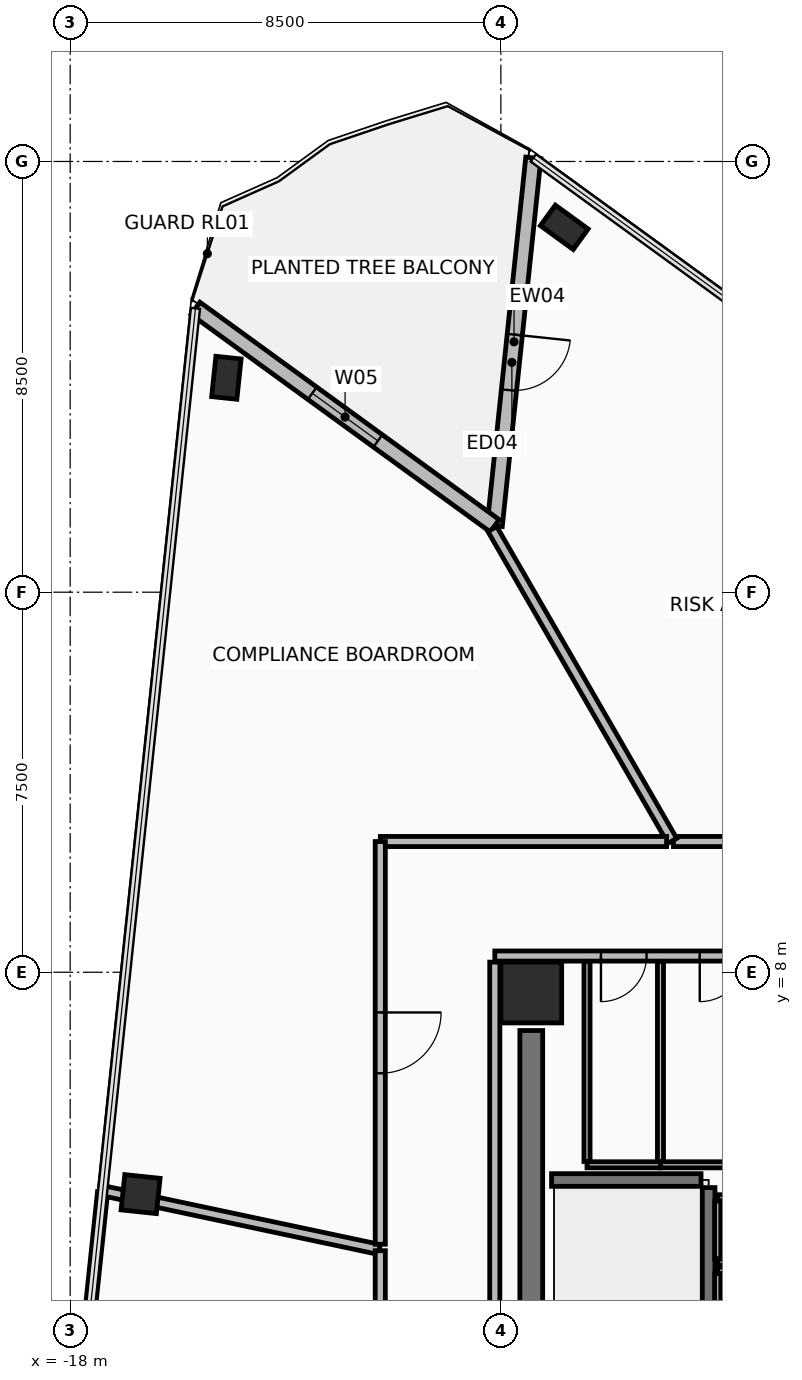
"""IFC4 building model, lengths in metres.
Left out: names, types, materials, properties, quantities, classifications, styles, units other than length and angle.
Written with IfcOpenShell. Run it as: python <this file> out.ifc"""

import sys

from ifc_helpers import new_model, si_unit, direction, frame, frame_2d, origin, origin_2d, place, context, subcontext, project, spatial, rectangle, hollow_rectangle, extrude, element, fill, save


model = new_model("IFC4")
c1 = context("Model", 3, precision=1e-05, world=origin(), true_north=direction((0.0, 1.0)))
c2 = subcontext(c1, "Body", "Model", "MODEL_VIEW")
j1 = project(units=[si_unit("LENGTHUNIT", "METRE"), si_unit("PLANEANGLEUNIT", "RADIAN")], contexts=[c1])
p1 = place(None, origin())
s1 = spatial("IfcSite", under=j1, at=p1, CompositionType="ELEMENT")
p2 = place(p1, origin())
s2 = spatial("IfcBuilding", under=s1, at=p2, CompositionType="ELEMENT")
p3 = place(p2, frame((0.0, 0.0, 126.85)))
s3 = spatial("IfcBuildingStorey", under=s2, at=p3, CompositionType="ELEMENT", Elevation=126.85)
p4 = place(p3, frame((-8.9, 7.6, 0.0), z_axis=(0.0, 0.0, 1.0), x_axis=(1.0, 0.0, 0.0)))
e1 = element("IfcColumn", 1, at=p4, inside=s3, PredefinedType="COLUMN", context=c2, shape_type="SweptSolid", body=[
    extrude(rectangle(XDim=1.2, YDim=1.2, at=origin_2d()), origin(), (0.0, 0.0, 1.0), 3.6),
])
p5 = place(p3, frame((-14.917, 19.731, 0.0), z_axis=(0.0, 0.0, 1.0), x_axis=(0.104530199036, 0.99452171293, 0.0)))
e2 = element("IfcColumn", 2, at=p5, inside=s3, PredefinedType="COLUMN", context=c2, shape_type="SweptSolid", body=[
    extrude(hollow_rectangle(XDim=0.5, YDim=0.8, WallThickness=0.04, at=origin_2d()), origin(), (0.0, 0.0, 1.0), 3.6),
])
p6 = place(p3, frame((-16.611, 3.622, 0.0), z_axis=(0.0, 0.0, 1.0), x_axis=(0.104530199036, 0.99452171293, 0.0)))
e3 = element("IfcColumn", 3, at=p6, inside=s3, PredefinedType="COLUMN", context=c2, shape_type="SweptSolid", body=[
    extrude(hollow_rectangle(XDim=0.7, YDim=0.7, WallThickness=0.04, at=origin_2d()), origin(), (0.0, 0.0, 1.0), 3.6),
])
p7 = place(p3, frame((-8.249, 22.701, 0.0), z_axis=(0.0, 0.0, 1.0), x_axis=(-0.809016994375, 0.587785252292, 0.0)))
e4 = element("IfcColumn", 4, at=p7, inside=s3, PredefinedType="COLUMN", context=c2, shape_type="SweptSolid", body=[
    extrude(hollow_rectangle(XDim=0.5, YDim=0.8, WallThickness=0.04, at=origin_2d()), origin(), (0.0, 0.0, 1.0), 3.6),
])
p8 = place(p3, frame((-8.859, 24.071, 0.0), z_axis=(0.0, 0.0, 1.0), x_axis=(-0.104512431924, -0.9945235802, 0.0)))
e5 = element("IfcWall", 5, at=p8, inside=s3, PredefinedType="STANDARD", context=c2, shape_type="SweptSolid", body=[
    extrude(rectangle(XDim=7.3, YDim=0.3, at=frame_2d((3.65, 0.0))), origin(), (0.0, 0.0, 1.0), 2.705),
])
p9 = place(p8, frame((3.508, 0.0, 0.0)))
e6 = element("IfcOpeningElement", 6, at=p9, cuts=e5, PredefinedType="OPENING", context=c2, shape_type="SweptSolid", body=[
    extrude(rectangle(XDim=1.1, YDim=2.2, at=frame_2d((0.55, 1.1))), frame((0.0, 0.16, 0.0), z_axis=(0.0, -1.0, 0.0), x_axis=(1.0, 0.0, 0.0)), (0.0, 0.0, 1.0), 0.32),
])
p10 = place(p3, frame((-9.622, 16.811, 0.0), z_axis=(0.0, 0.0, 1.0), x_axis=(-0.809002104592, 0.587805745775, 0.0)))
e7 = element("IfcWall", 7, at=p10, inside=s3, PredefinedType="STANDARD", context=c2, shape_type="SweptSolid", body=[
    extrude(rectangle(XDim=7.3, YDim=0.3, at=frame_2d((3.65, 0.0))), origin(), (0.0, 0.0, 1.0), 2.705),
])
p11 = place(p10, frame((2.85, 0.0, 0.325)))
e8 = element("IfcOpeningElement", 8, at=p11, cuts=e7, PredefinedType="OPENING", context=c2, shape_type="SweptSolid", body=[
    extrude(rectangle(XDim=1.6, YDim=2.2, at=frame_2d((0.8, 1.1))), frame((0.0, 0.16, 0.0), z_axis=(0.0, -1.0, 0.0), x_axis=(1.0, 0.0, 0.0)), (0.0, 0.0, 1.0), 0.32),
])
p12 = place(p3, frame((-8.9, -3.85, 0.0), z_axis=(0.0, 0.0, 1.0), x_axis=(0.0, 1.0, 0.0)))
e9 = element("IfcWall", 9, at=p12, inside=s3, PredefinedType="SHEAR", context=c2, shape_type="SweptSolid", body=[
    extrude(rectangle(XDim=10.7, YDim=0.45, at=frame_2d((5.35, 0.0))), origin(), (0.0, 0.0, 1.0), 3.41),
])
p13 = place(p3, frame((9.62, 8.32, 0.0), z_axis=(0.0, 0.0, 1.0), x_axis=(-1.0, 0.0, 0.0)))
e10 = element("IfcWall", 10, at=p13, inside=s3, PredefinedType="PARTITIONING", context=c2, shape_type="SweptSolid", body=[
    extrude(rectangle(XDim=19.24, YDim=0.2, at=frame_2d((9.62, 0.0))), origin(), (0.0, 0.0, 1.0), 2.755),
])
p14 = place(p13, frame((16.245, 0.0, 0.0)))
e11 = element("IfcOpeningElement", 11, at=p14, cuts=e10, PredefinedType="OPENING", context=c2, shape_type="SweptSolid", body=[
    extrude(rectangle(XDim=0.9, YDim=2.1, at=frame_2d((0.45, 1.05))), frame((0.0, 0.11, 0.0), z_axis=(0.0, -1.0, 0.0), x_axis=(1.0, 0.0, 0.0)), (0.0, 0.0, 1.0), 0.22),
])
p15 = place(p13, frame((14.295, 0.0, 0.0)))
e12 = element("IfcOpeningElement", 12, at=p15, cuts=e10, PredefinedType="OPENING", context=c2, shape_type="SweptSolid", body=[
    extrude(rectangle(XDim=0.9, YDim=2.1, at=frame_2d((0.45, 1.05))), frame((0.0, 0.11, 0.0), z_axis=(0.0, -1.0, 0.0), x_axis=(1.0, 0.0, 0.0)), (0.0, 0.0, 1.0), 0.22),
])
p16 = place(p3, frame((-9.62, 8.2, 0.0), z_axis=(0.0, 0.0, 1.0), x_axis=(0.0, -1.0, 0.0)))
e13 = element("IfcWall", 13, at=p16, inside=s3, PredefinedType="PARTITIONING", context=c2, shape_type="SweptSolid", body=[
    extrude(rectangle(XDim=16.4, YDim=0.2, at=frame_2d((8.2, 0.0))), origin(), (0.0, 0.0, 1.0), 2.855),
])
p17 = place(p16, frame((12.65, 0.0, 0.0)))
e14 = element("IfcOpeningElement", 14, at=p17, cuts=e13, PredefinedType="OPENING", context=c2, shape_type="SweptSolid", body=[
    extrude(rectangle(XDim=1.1, YDim=2.15, at=frame_2d((0.55, 1.075))), frame((0.0, 0.11, 0.0), z_axis=(0.0, -1.0, 0.0), x_axis=(1.0, 0.0, 0.0)), (0.0, 0.0, 1.0), 0.22),
])
p18 = place(p3, frame((-5.4, -3.55, 0.0), z_axis=(0.0, 0.0, 1.0), x_axis=(0.0, 1.0, 0.0)))
e15 = element("IfcWall", 15, at=p18, inside=s3, PredefinedType="SHEAR", context=c2, shape_type="SweptSolid", body=[
    extrude(rectangle(XDim=7.3, YDim=0.25, at=frame_2d((3.65, 0.0))), origin(), (0.0, 0.0, 1.0), 3.41),
])
p19 = place(p3, frame((-8.5, 3.9, 0.0), z_axis=(0.0, 0.0, 1.0), x_axis=(1.0, 0.0, 0.0)))
e16 = element("IfcWall", 16, at=p19, inside=s3, PredefinedType="SHEAR", context=c2, shape_type="SweptSolid", body=[
    extrude(rectangle(XDim=2.95, YDim=0.25, at=frame_2d((1.475, 0.0))), origin(), (0.0, 0.0, 1.0), 3.41),
])
p20 = place(p3, frame((-5.22, 2.28, 0.0), z_axis=(0.0, 0.0, 1.0), x_axis=(1.0, 0.0, 0.0)))
e17 = element("IfcWall", 17, at=p20, inside=s3, PredefinedType="PARTITIONING", context=c2, shape_type="SweptSolid", body=[
    extrude(rectangle(XDim=3.47, YDim=0.12, at=frame_2d((1.735, 0.0))), origin(), (0.0, 0.0, 1.0), 3.41),
])
p21 = place(p3, frame((-1.815, 3.55, 0.0), z_axis=(0.0, 0.0, 1.0), x_axis=(-1.0, 0.0, 0.0)))
e18 = element("IfcWall", 18, at=p21, inside=s3, PredefinedType="PARTITIONING", context=c2, shape_type="SweptSolid", body=[
    extrude(rectangle(XDim=3.405, YDim=0.12, at=frame_2d((1.703, 0.0))), origin(), (0.0, 0.0, 1.0), 3.41),
])
p22 = place(p3, frame((-5.22, 3.485, 0.0), z_axis=(0.0, 0.0, 1.0), x_axis=(0.0, -1.0, 0.0)))
e19 = element("IfcWall", 19, at=p22, inside=s3, PredefinedType="PARTITIONING", context=c2, shape_type="SweptSolid", body=[
    extrude(rectangle(XDim=1.14, YDim=0.12, at=frame_2d((0.57, 0.0))), origin(), (0.0, 0.0, 1.0), 3.41),
])
p23 = place(p3, frame((-1.815, 2.12, 0.0), z_axis=(0.0, 0.0, 1.0), x_axis=(-1.0, 0.0, 0.0)))
e20 = element("IfcWall", 20, at=p23, inside=s3, PredefinedType="PARTITIONING", context=c2, shape_type="SweptSolid", body=[
    extrude(rectangle(XDim=3.405, YDim=0.12, at=frame_2d((1.703, 0.0))), origin(), (0.0, 0.0, 1.0), 3.41),
])
p24 = place(p3, frame((-5.22, 2.055, 0.0), z_axis=(0.0, 0.0, 1.0), x_axis=(0.0, -1.0, 0.0)))
e21 = element("IfcWall", 21, at=p24, inside=s3, PredefinedType="PARTITIONING", context=c2, shape_type="SweptSolid", body=[
    extrude(rectangle(XDim=1.11, YDim=0.12, at=frame_2d((0.555, 0.0))), origin(), (0.0, 0.0, 1.0), 3.41),
])
p25 = place(p3, frame((-7.8, 4.2, 0.0), z_axis=(0.0, 0.0, 1.0), x_axis=(1.0, 0.0, 0.0)))
e22 = element("IfcWall", 22, at=p25, inside=s3, PredefinedType="PARTITIONING", context=c2, shape_type="SweptSolid", body=[
    extrude(rectangle(XDim=1.45, YDim=0.12, at=frame_2d((0.725, 0.0))), origin(), (0.0, 0.0, 1.0), 3.41),
])
for number, where, z_axis, x_axis in (
    (23, (-6.35, 4.265, 0.0), (0.0, 0.0, 1.0), (0.0, 1.0, 0.0)),
    (24, (-7.8, 8.215, 0.0), (0.0, 0.0, 1.0), (0.0, -1.0, 0.0)),
):
    element("IfcWall", number, at=place(p3, frame(where, z_axis=z_axis, x_axis=x_axis)), inside=s3, PredefinedType="PARTITIONING", context=c2, shape_type="SweptSolid", body=[
        extrude(rectangle(XDim=3.95, YDim=0.12, at=frame_2d((1.975, 0.0))), origin(), (0.0, 0.0, 1.0), 2.605),
    ])
p26 = place(p3, frame((-6.35, 4.2, 0.0), z_axis=(0.0, 0.0, 1.0), x_axis=(1.0, 0.0, 0.0)))
e25 = element("IfcWall", 25, at=p26, inside=s3, PredefinedType="PARTITIONING", context=c2, shape_type="SweptSolid", body=[
    extrude(rectangle(XDim=2.45, YDim=0.12, at=frame_2d((1.225, 0.0))), origin(), (0.0, 0.0, 1.0), 3.41),
])
p27 = place(p3, frame((-19.067, -12.57, 0.0), z_axis=(0.0, 0.0, 1.0), x_axis=(0.104530607356, 0.994521670013, 0.0)))
e26 = element("IfcWall", 26, at=p27, inside=s3, PredefinedType="PARTITIONING", context=c2, shape_type="SweptSolid", body=[
    extrude(rectangle(XDim=16.321, YDim=0.2, at=frame_2d((8.161, 0.0))), origin(), (0.0, 0.0, 1.0), 3.41),
])
p28 = place(p3, frame((-17.331, 3.684, 0.0), z_axis=(0.0, 0.0, 1.0), x_axis=(0.978148567961, -0.207907140322, 0.0)))
e27 = element("IfcWall", 27, at=p28, inside=s3, PredefinedType="PARTITIONING", context=c2, shape_type="SweptSolid", body=[
    extrude(rectangle(XDim=5.552, YDim=0.2, at=frame_2d((2.776, 0.0))), origin(), (0.0, 0.0, 1.0), 2.705),
])
p29 = place(p3, frame((-11.88, 2.505, 0.0), z_axis=(0.0, 0.0, 1.0), x_axis=(0.0, -1.0, 0.0)))
e28 = element("IfcWall", 28, at=p29, inside=s3, PredefinedType="PARTITIONING", context=c2, shape_type="SweptSolid", body=[
    extrude(rectangle(XDim=9.396, YDim=0.2, at=frame_2d((4.698, 0.0))), origin(), (0.0, 0.0, 1.0), 3.41),
])
p30 = place(p29, frame((4.273, 0.0, 0.0)))
e29 = element("IfcOpeningElement", 29, at=p30, cuts=e28, PredefinedType="OPENING", context=c2, shape_type="SweptSolid", body=[
    extrude(rectangle(XDim=0.85, YDim=2.1, at=frame_2d((0.425, 1.05))), frame((0.0, 0.11, 0.0), z_axis=(0.0, -1.0, 0.0), x_axis=(1.0, 0.0, 0.0)), (0.0, 0.0, 1.0), 0.22),
])
p31 = place(p3, frame((3.419, 10.58, 0.0), z_axis=(0.0, 0.0, 1.0), x_axis=(-1.0, 0.0, 0.0)))
e30 = element("IfcWall", 30, at=p31, inside=s3, PredefinedType="PARTITIONING", context=c2, shape_type="SweptSolid", body=[
    extrude(rectangle(XDim=9.513, YDim=0.2, at=frame_2d((4.757, 0.0))), origin(), (0.0, 0.0, 1.0), 3.045),
])
p32 = place(p31, frame((4.257, 0.0, 0.0)))
e31 = element("IfcOpeningElement", 31, at=p32, cuts=e30, PredefinedType="OPENING", context=c2, shape_type="SweptSolid", body=[
    extrude(rectangle(XDim=1.0, YDim=2.15, at=frame_2d((0.5, 1.075))), frame((0.0, 0.11, 0.0), z_axis=(0.0, -1.0, 0.0), x_axis=(1.0, 0.0, 0.0)), (0.0, 0.0, 1.0), 0.22),
])
p33 = place(p3, frame((-6.115, 10.593, 0.0), z_axis=(0.0, 0.0, 1.0), x_axis=(-0.50001885532, 0.866014517387, 0.0)))
e32 = element("IfcWall", 32, at=p33, inside=s3, PredefinedType="PARTITIONING", context=c2, shape_type="SweptSolid", body=[
    extrude(rectangle(XDim=7.106, YDim=0.2, at=frame_2d((3.553, 0.0))), origin(), (0.0, 0.0, 1.0), 2.855),
])
p34 = place(p3, frame((-6.229, 10.58, 0.0), z_axis=(0.0, 0.0, 1.0), x_axis=(-1.0, 0.0, 0.0)))
e33 = element("IfcWall", 33, at=p34, inside=s3, PredefinedType="PARTITIONING", context=c2, shape_type="SweptSolid", body=[
    extrude(rectangle(XDim=5.65, YDim=0.2, at=frame_2d((2.825, 0.0))), origin(), (0.0, 0.0, 1.0), 2.755),
])
p35 = place(p3, frame((-11.88, 10.579, 0.0), z_axis=(0.0, 0.0, 1.0), x_axis=(0.0, -1.0, 0.0)))
e34 = element("IfcWall", 34, at=p35, inside=s3, PredefinedType="PARTITIONING", context=c2, shape_type="SweptSolid", body=[
    extrude(rectangle(XDim=7.947, YDim=0.2, at=frame_2d((3.973, 0.0))), origin(), (0.0, 0.0, 1.0), 2.855),
])
p36 = place(p35, frame((3.373, 0.0, 0.0)))
e35 = element("IfcOpeningElement", 35, at=p36, cuts=e34, PredefinedType="OPENING", context=c2, shape_type="SweptSolid", body=[
    extrude(rectangle(XDim=1.2, YDim=2.15, at=frame_2d((0.6, 1.075))), frame((0.0, 0.11, 0.0), z_axis=(0.0, -1.0, 0.0), x_axis=(1.0, 0.0, 0.0)), (0.0, 0.0, 1.0), 0.22),
])
p37 = place(p9, origin())
e36 = element("IfcDoor", 36, at=p37, inside=s3, OperationType="SINGLE_SWING_LEFT", PredefinedType="DOOR", context=c2, shape_type="SweptSolid", body=[
    extrude(rectangle(XDim=1.1, YDim=2.2, at=frame_2d((0.55, 1.1))), frame((0.0, 0.025, 0.0), z_axis=(0.0, -1.0, 0.0), x_axis=(1.0, 0.0, 0.0)), (0.0, 0.0, 1.0), 0.05),
])
fill(e6, e36)
p38 = place(p11, origin())
e37 = element("IfcWindow", 37, at=p38, inside=s3, PartitioningType="SINGLE_PANEL", PredefinedType="WINDOW", context=c2, shape_type="SweptSolid", body=[
    extrude(rectangle(XDim=1.6, YDim=2.2, at=frame_2d((0.8, 1.1))), frame((0.0, 0.03, 0.0), z_axis=(0.0, -1.0, 0.0), x_axis=(1.0, 0.0, 0.0)), (0.0, 0.0, 1.0), 0.06),
])
fill(e8, e37)
p39 = place(p14, frame((0.9, 0.0, 0.0), z_axis=(0.0, 0.0, 1.0), x_axis=(-1.0, 0.0, 0.0)))
e38 = element("IfcDoor", 38, at=p39, inside=s3, OperationType="SINGLE_SWING_LEFT", PredefinedType="DOOR", context=c2, shape_type="SweptSolid", body=[
    extrude(rectangle(XDim=0.9, YDim=2.1, at=frame_2d((0.45, 1.05))), frame((0.0, 0.025, 0.0), z_axis=(0.0, -1.0, 0.0), x_axis=(1.0, 0.0, 0.0)), (0.0, 0.0, 1.0), 0.05),
])
fill(e11, e38)
p40 = place(p15, frame((0.9, 0.0, 0.0), z_axis=(0.0, 0.0, 1.0), x_axis=(-1.0, 0.0, 0.0)))
e39 = element("IfcDoor", 39, at=p40, inside=s3, OperationType="SINGLE_SWING_LEFT", PredefinedType="DOOR", context=c2, shape_type="SweptSolid", body=[
    extrude(rectangle(XDim=0.9, YDim=2.1, at=frame_2d((0.45, 1.05))), frame((0.0, 0.025, 0.0), z_axis=(0.0, -1.0, 0.0), x_axis=(1.0, 0.0, 0.0)), (0.0, 0.0, 1.0), 0.05),
])
fill(e12, e39)
p41 = place(p36, origin())
e40 = element("IfcDoor", 40, at=p41, inside=s3, OperationType="SINGLE_SWING_LEFT", PredefinedType="DOOR", context=c2, shape_type="SweptSolid", body=[
    extrude(rectangle(XDim=1.2, YDim=2.15, at=frame_2d((0.6, 1.075))), frame((0.0, 0.025, 0.0), z_axis=(0.0, -1.0, 0.0), x_axis=(1.0, 0.0, 0.0)), (0.0, 0.0, 1.0), 0.05),
])
fill(e35, e40)
save(model, sys.argv[1])
